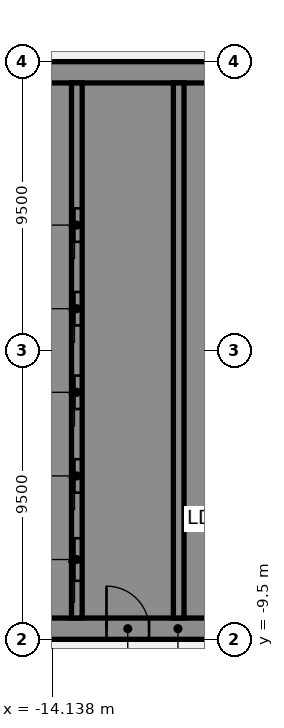
"""IFC4 building model, lengths in metres.
Left out: names, types, materials, properties, quantities, classifications, styles, units other than length and angle.
Written with IfcOpenShell. Run it as: python <this file> out.ifc"""

import sys

from ifc_helpers import new_model, si_unit, direction, frame, frame_2d, origin, place, context, subcontext, project, spatial, polyline, rectangle, outline, extrude, element, fill, save


model = new_model("IFC4")
c1 = context("Model", 3, precision=1e-05, world=origin(), true_north=direction((0.0, 1.0)))
c2 = subcontext(c1, "Body", "Model", "MODEL_VIEW")
j1 = project(units=[si_unit("LENGTHUNIT", "METRE"), si_unit("PLANEANGLEUNIT", "RADIAN")], contexts=[c1])
p1 = place(None, origin())
s1 = spatial("IfcSite", under=j1, at=p1, CompositionType="ELEMENT")
p2 = place(p1, origin())
s2 = spatial("IfcBuilding", under=s1, at=p2, CompositionType="ELEMENT")
p3 = place(p2, frame((0.0, 0.0, -7.0)))
s3 = spatial("IfcBuildingStorey", under=s2, at=p3, CompositionType="ELEMENT", Elevation=-7.0)
p4 = place(p3, frame((-16.5, -9.15, 0.0), z_axis=(0.0, 0.0, 1.0), x_axis=(1.0, 0.0, 0.0)))
e1 = element("IfcWall", 1, at=p4, inside=s3, PredefinedType="SHEAR", context=c2, shape_type="SweptSolid", body=[
    extrude(rectangle(XDim=13.0, YDim=0.7, at=frame_2d((6.5, 0.0))), origin(), (0.0, 0.0, 1.0), 6.45),
])
p5 = place(p4, frame((4.15, 0.0, 0.0)))
e2 = element("IfcOpeningElement", 2, at=p5, cuts=e1, PredefinedType="OPENING", context=c2, shape_type="SweptSolid", body=[
    extrude(rectangle(XDim=1.4, YDim=2.1, at=frame_2d((0.7, 1.05))), frame((0.0, 0.36, 0.0), z_axis=(0.0, -1.0, 0.0), x_axis=(1.0, 0.0, 0.0)), (0.0, 0.0, 1.0), 0.72),
])
p6 = place(p4, frame((10.125, 0.0, 0.0)))
e3 = element("IfcOpeningElement", 3, at=p6, cuts=e1, PredefinedType="OPENING", context=c2, shape_type="SweptSolid", body=[
    extrude(rectangle(XDim=1.4, YDim=2.1, at=frame_2d((0.7, 1.05))), frame((0.0, 0.36, 0.0), z_axis=(0.0, -1.0, 0.0), x_axis=(1.0, 0.0, 0.0)), (0.0, 0.0, 1.0), 0.72),
])
p7 = place(p3, origin())
e4 = element("IfcWall", 4, at=p7, inside=s3, PredefinedType="SHEAR", context=c2, shape_type="SweptSolid", body=[
    extrude(outline(polyline([(-13.5, -8.8), (-13.5, -8.125), (-15.8, -8.125), (-15.8, -5.625), (-13.5, -5.625), (-13.5, -5.375), (-15.8, -5.375), (-15.8, -2.875), (-13.5, -2.875), (-13.5, -2.625), (-15.8, -2.625), (-15.8, -0.125), (-13.5, -0.125), (-13.5, 0.125), (-15.8, 0.125), (-15.8, 2.625), (-13.5, 2.625), (-13.5, 2.875), (-15.8, 2.875), (-15.8, 5.375), (-13.5, 5.375), (-13.5, 5.625), (-15.8, 5.625), (-15.8, 8.125), (-13.5, 8.125), (-13.5, 8.8), (-15.8, 8.8), (-16.5, 8.8), (-16.5, -8.8), (-15.8, -8.8), (-13.5, -8.8)])), origin(), (0.0, 0.0, 1.0), 6.45),
])
p8 = place(p3, frame((-16.5, 9.15, 0.0), z_axis=(0.0, 0.0, 1.0), x_axis=(1.0, 0.0, 0.0)))
e5 = element("IfcWall", 5, at=p8, inside=s3, PredefinedType="SHEAR", context=c2, shape_type="SweptSolid", body=[
    extrude(rectangle(XDim=13.0, YDim=0.7, at=frame_2d((6.5, 0.0))), origin(), (0.0, 0.0, 1.0), 6.45),
])
p9 = place(p3, origin())
e6 = element("IfcWall", 6, at=p9, inside=s3, PredefinedType="SHEAR", context=c2, shape_type="SweptSolid", body=[
    extrude(outline(polyline([(-9.8, -5.375), (-9.8, -5.625), (-7.5, -5.625), (-7.15, -5.625), (-7.15, 8.8), (-7.5, 8.8), (-9.8, 8.8), (-9.8, 8.125), (-7.5, 8.125), (-7.5, 5.625), (-9.8, 5.625), (-9.8, 5.375), (-7.5, 5.375), (-7.5, 2.875), (-9.8, 2.875), (-9.8, 2.625), (-7.5, 2.625), (-7.5, 0.125), (-9.8, 0.125), (-9.8, -0.125), (-7.5, -0.125), (-7.5, -2.625), (-9.8, -2.625), (-9.8, -2.875), (-7.5, -2.875), (-7.5, -5.375), (-9.8, -5.375)])), origin(), (0.0, 0.0, 1.0), 6.45),
])
p10 = place(p3, origin())
e7 = element("IfcWall", 7, at=p10, inside=s3, PredefinedType="SHEAR", context=c2, shape_type="SweptSolid", body=[
    extrude(outline(polyline([(-7.5, -8.125), (-9.55, -8.125), (-9.55, -5.625), (-9.8, -5.625), (-9.8, -8.125), (-9.8, -8.8), (-7.5, -8.8), (-7.5, -8.125)])), origin(), (0.0, 0.0, 1.0), 6.45),
])
p11 = place(p3, frame((-13.325, -8.8, 0.0), z_axis=(0.0, 0.0, 1.0), x_axis=(0.0, 1.0, 0.0)))
e8 = element("IfcWall", 8, at=p11, inside=s3, PredefinedType="SHEAR", context=c2, shape_type="SweptSolid", body=[
    extrude(rectangle(XDim=17.6, YDim=0.35, at=frame_2d((8.8, 0.0))), origin(), (0.0, 0.0, 1.0), 6.45),
])
p12 = place(p11, frame((1.225, 0.0, 0.0)))
e9 = element("IfcOpeningElement", 9, at=p12, cuts=e8, PredefinedType="OPENING", context=c2, shape_type="SweptSolid", body=[
    extrude(rectangle(XDim=1.4, YDim=2.1, at=frame_2d((0.7, 1.05))), frame((0.0, 0.185, 0.0), z_axis=(0.0, -1.0, 0.0), x_axis=(1.0, 0.0, 0.0)), (0.0, 0.0, 1.0), 0.37),
])
p13 = place(p11, frame((4.125, 0.0, 0.0)))
e10 = element("IfcOpeningElement", 10, at=p13, cuts=e8, PredefinedType="OPENING", context=c2, shape_type="SweptSolid", body=[
    extrude(rectangle(XDim=1.1, YDim=2.1, at=frame_2d((0.55, 1.05))), frame((0.0, 0.185, 0.0), z_axis=(0.0, -1.0, 0.0), x_axis=(1.0, 0.0, 0.0)), (0.0, 0.0, 1.0), 0.37),
])
p14 = place(p11, frame((6.875, 0.0, 0.0)))
e11 = element("IfcOpeningElement", 11, at=p14, cuts=e8, PredefinedType="OPENING", context=c2, shape_type="SweptSolid", body=[
    extrude(rectangle(XDim=1.1, YDim=2.1, at=frame_2d((0.55, 1.05))), frame((0.0, 0.185, 0.0), z_axis=(0.0, -1.0, 0.0), x_axis=(1.0, 0.0, 0.0)), (0.0, 0.0, 1.0), 0.37),
])
p15 = place(p11, frame((9.625, 0.0, 0.0)))
e12 = element("IfcOpeningElement", 12, at=p15, cuts=e8, PredefinedType="OPENING", context=c2, shape_type="SweptSolid", body=[
    extrude(rectangle(XDim=1.1, YDim=2.1, at=frame_2d((0.55, 1.05))), frame((0.0, 0.185, 0.0), z_axis=(0.0, -1.0, 0.0), x_axis=(1.0, 0.0, 0.0)), (0.0, 0.0, 1.0), 0.37),
])
p16 = place(p11, frame((12.375, 0.0, 0.0)))
e13 = element("IfcOpeningElement", 13, at=p16, cuts=e8, PredefinedType="OPENING", context=c2, shape_type="SweptSolid", body=[
    extrude(rectangle(XDim=1.1, YDim=2.1, at=frame_2d((0.55, 1.05))), frame((0.0, 0.185, 0.0), z_axis=(0.0, -1.0, 0.0), x_axis=(1.0, 0.0, 0.0)), (0.0, 0.0, 1.0), 0.37),
])
p17 = place(p3, frame((-9.975, -8.8, 0.0), z_axis=(0.0, 0.0, 1.0), x_axis=(0.0, 1.0, 0.0)))
e14 = element("IfcWall", 14, at=p17, inside=s3, PredefinedType="SHEAR", context=c2, shape_type="SweptSolid", body=[
    extrude(rectangle(XDim=17.6, YDim=0.35, at=frame_2d((8.8, 0.0))), origin(), (0.0, 0.0, 1.0), 6.45),
])
p18 = place(p5, origin())
e15 = element("IfcDoor", 15, at=p18, inside=s3, OperationType="SINGLE_SWING_LEFT", PredefinedType="DOOR", context=c2, shape_type="SweptSolid", body=[
    extrude(rectangle(XDim=1.4, YDim=2.1, at=frame_2d((0.7, 1.05))), frame((0.0, 0.025, 0.0), z_axis=(0.0, -1.0, 0.0), x_axis=(1.0, 0.0, 0.0)), (0.0, 0.0, 1.0), 0.05),
])
fill(e2, e15)
p19 = place(p12, origin())
e16 = element("IfcDoor", 16, at=p19, inside=s3, OperationType="SLIDING_TO_LEFT", PredefinedType="DOOR", context=c2, shape_type="SweptSolid", body=[
    extrude(rectangle(XDim=1.4, YDim=2.1, at=frame_2d((0.7, 1.05))), frame((0.0, 0.025, 0.0), z_axis=(0.0, -1.0, 0.0), x_axis=(1.0, 0.0, 0.0)), (0.0, 0.0, 1.0), 0.05),
])
fill(e9, e16)
p20 = place(p13, origin())
e17 = element("IfcDoor", 17, at=p20, inside=s3, OperationType="SLIDING_TO_LEFT", PredefinedType="DOOR", context=c2, shape_type="SweptSolid", body=[
    extrude(rectangle(XDim=1.1, YDim=2.1, at=frame_2d((0.55, 1.05))), frame((0.0, 0.025, 0.0), z_axis=(0.0, -1.0, 0.0), x_axis=(1.0, 0.0, 0.0)), (0.0, 0.0, 1.0), 0.05),
])
fill(e10, e17)
p21 = place(p14, origin())
e18 = element("IfcDoor", 18, at=p21, inside=s3, OperationType="SLIDING_TO_LEFT", PredefinedType="DOOR", context=c2, shape_type="SweptSolid", body=[
    extrude(rectangle(XDim=1.1, YDim=2.1, at=frame_2d((0.55, 1.05))), frame((0.0, 0.025, 0.0), z_axis=(0.0, -1.0, 0.0), x_axis=(1.0, 0.0, 0.0)), (0.0, 0.0, 1.0), 0.05),
])
fill(e11, e18)
p22 = place(p15, origin())
e19 = element("IfcDoor", 19, at=p22, inside=s3, OperationType="SLIDING_TO_LEFT", PredefinedType="DOOR", context=c2, shape_type="SweptSolid", body=[
    extrude(rectangle(XDim=1.1, YDim=2.1, at=frame_2d((0.55, 1.05))), frame((0.0, 0.025, 0.0), z_axis=(0.0, -1.0, 0.0), x_axis=(1.0, 0.0, 0.0)), (0.0, 0.0, 1.0), 0.05),
])
fill(e12, e19)
p23 = place(p16, origin())
e20 = element("IfcDoor", 20, at=p23, inside=s3, OperationType="SLIDING_TO_LEFT", PredefinedType="DOOR", context=c2, shape_type="SweptSolid", body=[
    extrude(rectangle(XDim=1.1, YDim=2.1, at=frame_2d((0.55, 1.05))), frame((0.0, 0.025, 0.0), z_axis=(0.0, -1.0, 0.0), x_axis=(1.0, 0.0, 0.0)), (0.0, 0.0, 1.0), 0.05),
])
fill(e13, e20)
save(model, sys.argv[1])
